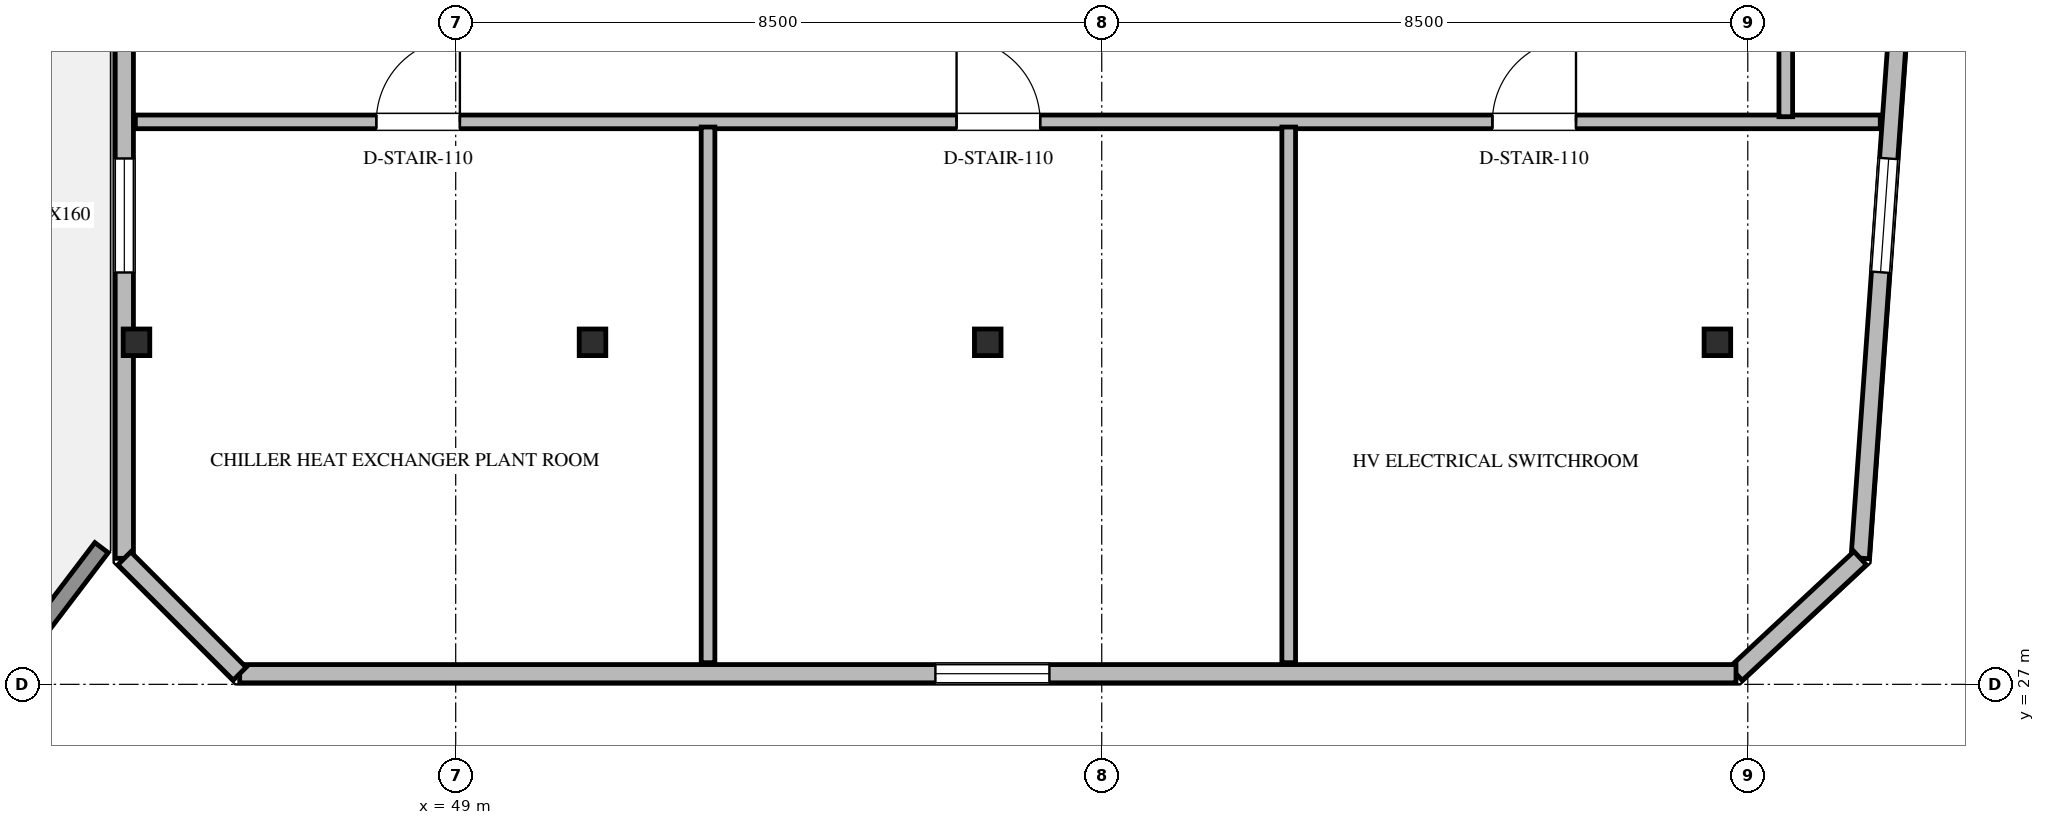
"""IFC4 building model, lengths in metres.
Left out: names, types, materials, properties, quantities, classifications, styles, units other than length and angle.
Written with IfcOpenShell. Run it as: python <this file> out.ifc"""

import sys

from ifc_helpers import new_model, si_unit, direction, frame, frame_2d, origin, origin_2d, place, context, subcontext, project, spatial, rectangle, hollow_rectangle, extrude, element, fill, save


model = new_model("IFC4")
c1 = context("Model", 3, precision=1e-05, world=origin(), true_north=direction((0.0, 1.0)))
c2 = subcontext(c1, "Body", "Model", "MODEL_VIEW")
j1 = project(units=[si_unit("LENGTHUNIT", "METRE"), si_unit("PLANEANGLEUNIT", "RADIAN")], contexts=[c1])
p1 = place(None, origin())
s1 = spatial("IfcSite", under=j1, at=p1, CompositionType="ELEMENT")
p2 = place(p1, origin())
s2 = spatial("IfcBuilding", under=s1, at=p2, CompositionType="ELEMENT")
p3 = place(p2, frame((0.0, 0.0, 315.6)))
s3 = spatial("IfcBuildingStorey", under=s2, at=p3, CompositionType="ELEMENT", Elevation=315.6)
for number, where, z_axis, x_axis in (
    (1, (56.0, 31.5, 0.0), (0.0, 0.0, 1.0), (1.0, 0.0, 0.0)),
    (2, (65.6, 31.5, 0.0), (0.0, 0.0, 1.0), (1.0, 0.0, 0.0)),
    (3, (50.8, 31.5, 0.0), (0.0, 0.0, 1.0), (1.0, 0.0, 0.0)),
    (4, (44.8, 31.5, 0.0), (0.0, 0.0, 1.0), (1.0, 0.0, 0.0)),
):
    element("IfcColumn", number, at=place(p3, frame(where, z_axis=z_axis, x_axis=x_axis)), inside=s3, PredefinedType="COLUMN", context=c2, shape_type="SweptSolid", body=[
        extrude(hollow_rectangle(XDim=0.35, YDim=0.35, WallThickness=0.016, at=origin_2d()), origin(), (0.0, 0.0, 1.0), 3.6),
    ])
p4 = place(p3, frame((44.34, 28.798, 0.0), z_axis=(0.0, 0.0, 1.0), x_axis=(-0.605088696204, -0.796158068304, 0.0)))
e5 = element("IfcWall", 5, at=p4, inside=s3, PredefinedType="PARAPET", context=c2, shape_type="SweptSolid", body=[
    extrude(rectangle(XDim=11.403, YDim=0.22, at=frame_2d((5.701, 0.0))), origin(), (0.0, 0.0, 1.0), 1.2),
])
p5 = place(p3, frame((44.64, 28.658, 0.0), z_axis=(0.0, 0.0, 1.0), x_axis=(0.0, 1.0, 0.0)))
e6 = element("IfcWall", 6, at=p5, inside=s3, PredefinedType="STANDARD", context=c2, shape_type="SweptSolid", body=[
    extrude(rectangle(XDim=9.142, YDim=0.24, at=frame_2d((4.571, 0.0))), origin(), (0.0, 0.0, 1.0), 2.709),
])
p6 = place(p5, frame((3.76, 0.0, 0.9)))
e7 = element("IfcOpeningElement", 7, at=p6, cuts=e6, PredefinedType="OPENING", context=c2, shape_type="SweptSolid", body=[
    extrude(rectangle(XDim=1.5, YDim=1.6, at=frame_2d((0.75, 0.8))), frame((0.0, 0.13, 0.0), z_axis=(0.0, -1.0, 0.0), x_axis=(1.0, 0.0, 0.0)), (0.0, 0.0, 1.0), 0.26),
])
p7 = place(p3, frame((68.131, 37.8, 0.0), z_axis=(0.0, 0.0, 1.0), x_axis=(-0.071250837206, -0.997458429308, 0.0)))
e8 = element("IfcWall", 8, at=p7, inside=s3, PredefinedType="STANDARD", context=c2, shape_type="SweptSolid", body=[
    extrude(rectangle(XDim=9.162, YDim=0.24, at=frame_2d((4.581, 0.0))), origin(), (0.0, 0.0, 1.0), 3.32),
])
p8 = place(p7, frame((3.892, 0.0, 0.9)))
e9 = element("IfcOpeningElement", 9, at=p8, cuts=e8, PredefinedType="OPENING", context=c2, shape_type="SweptSolid", body=[
    extrude(rectangle(XDim=1.5, YDim=1.6, at=frame_2d((0.75, 0.8))), frame((0.0, 0.13, 0.0), z_axis=(0.0, -1.0, 0.0), x_axis=(1.0, 0.0, 0.0)), (0.0, 0.0, 1.0), 0.26),
])
p9 = place(p3, frame((67.478, 28.661, 0.0), z_axis=(0.0, 0.0, 1.0), x_axis=(-0.731818720836, -0.681499346907, 0.0)))
e10 = element("IfcWall", 10, at=p9, inside=s3, PredefinedType="STANDARD", context=c2, shape_type="SweptSolid", body=[
    extrude(rectangle(XDim=2.232, YDim=0.24, at=frame_2d((1.116, 0.0))), origin(), (0.0, 0.0, 1.0), 3.32),
])
p10 = place(p3, frame((65.845, 27.14, 0.0), z_axis=(0.0, 0.0, 1.0), x_axis=(-1.0, 0.0, 0.0)))
e11 = element("IfcWall", 11, at=p10, inside=s3, PredefinedType="STANDARD", context=c2, shape_type="SweptSolid", body=[
    extrude(rectangle(XDim=19.687, YDim=0.24, at=frame_2d((9.844, 0.0))), origin(), (0.0, 0.0, 1.0), 3.32),
])
p11 = place(p10, frame((9.033, 0.0, 0.9)))
e12 = element("IfcOpeningElement", 12, at=p11, cuts=e11, PredefinedType="OPENING", context=c2, shape_type="SweptSolid", body=[
    extrude(rectangle(XDim=1.5, YDim=1.6, at=frame_2d((0.75, 0.8))), frame((0.0, 0.13, 0.0), z_axis=(0.0, -1.0, 0.0), x_axis=(1.0, 0.0, 0.0)), (0.0, 0.0, 1.0), 0.26),
])
p12 = place(p3, frame((46.158, 27.14, 0.0), z_axis=(0.0, 0.0, 1.0), x_axis=(-0.707106781187, 0.707106781187, 0.0)))
e13 = element("IfcWall", 13, at=p12, inside=s3, PredefinedType="STANDARD", context=c2, shape_type="SweptSolid", body=[
    extrude(rectangle(XDim=2.147, YDim=0.24, at=frame_2d((1.073, 0.0))), origin(), (0.0, 0.0, 1.0), 3.32),
])
p13 = place(p3, frame((44.785, 34.4, 0.0), z_axis=(0.0, 0.0, 1.0), x_axis=(1.0, 0.0, 0.0)))
e14 = element("IfcWall", 14, at=p13, inside=s3, PredefinedType="STANDARD", context=c2, shape_type="SweptSolid", body=[
    extrude(rectangle(XDim=22.958, YDim=0.18, at=frame_2d((11.479, 0.0))), origin(), (0.0, 0.0, 1.0), 2.709),
])
p14 = place(p13, frame((3.17, 0.0, 0.0)))
e15 = element("IfcOpeningElement", 15, at=p14, cuts=e14, PredefinedType="OPENING", context=c2, shape_type="SweptSolid", body=[
    extrude(rectangle(XDim=1.1, YDim=2.2, at=frame_2d((0.55, 1.1))), frame((0.0, 0.1, 0.0), z_axis=(0.0, -1.0, 0.0), x_axis=(1.0, 0.0, 0.0)), (0.0, 0.0, 1.0), 0.2),
])
p15 = place(p13, frame((10.805, 0.0, 0.0)))
e16 = element("IfcOpeningElement", 16, at=p15, cuts=e14, PredefinedType="OPENING", context=c2, shape_type="SweptSolid", body=[
    extrude(rectangle(XDim=1.1, YDim=2.2, at=frame_2d((0.55, 1.1))), frame((0.0, 0.1, 0.0), z_axis=(0.0, -1.0, 0.0), x_axis=(1.0, 0.0, 0.0)), (0.0, 0.0, 1.0), 0.2),
])
p16 = place(p13, frame((17.855, 0.0, 0.0)))
e17 = element("IfcOpeningElement", 17, at=p16, cuts=e14, PredefinedType="OPENING", context=c2, shape_type="SweptSolid", body=[
    extrude(rectangle(XDim=1.1, YDim=2.2, at=frame_2d((0.55, 1.1))), frame((0.0, 0.1, 0.0), z_axis=(0.0, -1.0, 0.0), x_axis=(1.0, 0.0, 0.0)), (0.0, 0.0, 1.0), 0.2),
])
p17 = place(p3, frame((66.5, 34.468, 0.0), z_axis=(0.0, 0.0, 1.0), x_axis=(0.0, 1.0, 0.0)))
e18 = element("IfcWall", 18, at=p17, inside=s3, PredefinedType="STANDARD", context=c2, shape_type="SweptSolid", body=[
    extrude(rectangle(XDim=3.582, YDim=0.18, at=frame_2d((1.791, 0.0))), origin(), (0.0, 0.0, 1.0), 2.709),
])
for number, where, z_axis, x_axis in (
    (19, (52.32, 27.285, 0.0), (0.0, 0.0, 1.0), (0.0, 1.0, 0.0)),
    (20, (59.96, 27.285, 0.0), (0.0, 0.0, 1.0), (0.0, 1.0, 0.0)),
):
    element("IfcWall", number, at=place(p3, frame(where, z_axis=z_axis, x_axis=x_axis)), inside=s3, PredefinedType="STANDARD", context=c2, shape_type="SweptSolid", body=[
        extrude(rectangle(XDim=7.047, YDim=0.18, at=frame_2d((3.523, 0.0))), origin(), (0.0, 0.0, 1.0), 2.709),
    ])
p18 = place(p6, origin())
e21 = element("IfcWindow", 21, at=p18, inside=s3, PartitioningType="SINGLE_PANEL", PredefinedType="WINDOW", context=c2, shape_type="SweptSolid", body=[
    extrude(rectangle(XDim=1.5, YDim=1.6, at=frame_2d((0.75, 0.8))), frame((0.0, 0.03, 0.0), z_axis=(0.0, -1.0, 0.0), x_axis=(1.0, 0.0, 0.0)), (0.0, 0.0, 1.0), 0.06),
])
fill(e7, e21)
p19 = place(p8, origin())
e22 = element("IfcWindow", 22, at=p19, inside=s3, PartitioningType="SINGLE_PANEL", PredefinedType="WINDOW", context=c2, shape_type="SweptSolid", body=[
    extrude(rectangle(XDim=1.5, YDim=1.6, at=frame_2d((0.75, 0.8))), frame((0.0, 0.03, 0.0), z_axis=(0.0, -1.0, 0.0), x_axis=(1.0, 0.0, 0.0)), (0.0, 0.0, 1.0), 0.06),
])
fill(e9, e22)
p20 = place(p11, origin())
e23 = element("IfcWindow", 23, at=p20, inside=s3, PartitioningType="SINGLE_PANEL", PredefinedType="WINDOW", context=c2, shape_type="SweptSolid", body=[
    extrude(rectangle(XDim=1.5, YDim=1.6, at=frame_2d((0.75, 0.8))), frame((0.0, 0.03, 0.0), z_axis=(0.0, -1.0, 0.0), x_axis=(1.0, 0.0, 0.0)), (0.0, 0.0, 1.0), 0.06),
])
fill(e12, e23)
p21 = place(p14, origin())
e24 = element("IfcDoor", 24, at=p21, inside=s3, OperationType="SINGLE_SWING_RIGHT", PredefinedType="DOOR", context=c2, shape_type="SweptSolid", body=[
    extrude(rectangle(XDim=1.1, YDim=2.2, at=frame_2d((0.55, 1.1))), frame((0.0, 0.025, 0.0), z_axis=(0.0, -1.0, 0.0), x_axis=(1.0, 0.0, 0.0)), (0.0, 0.0, 1.0), 0.05),
])
fill(e15, e24)
p22 = place(p15, origin())
e25 = element("IfcDoor", 25, at=p22, inside=s3, OperationType="SINGLE_SWING_LEFT", PredefinedType="DOOR", context=c2, shape_type="SweptSolid", body=[
    extrude(rectangle(XDim=1.1, YDim=2.2, at=frame_2d((0.55, 1.1))), frame((0.0, 0.025, 0.0), z_axis=(0.0, -1.0, 0.0), x_axis=(1.0, 0.0, 0.0)), (0.0, 0.0, 1.0), 0.05),
])
fill(e16, e25)
p23 = place(p16, origin())
e26 = element("IfcDoor", 26, at=p23, inside=s3, OperationType="SINGLE_SWING_RIGHT", PredefinedType="DOOR", context=c2, shape_type="SweptSolid", body=[
    extrude(rectangle(XDim=1.1, YDim=2.2, at=frame_2d((0.55, 1.1))), frame((0.0, 0.025, 0.0), z_axis=(0.0, -1.0, 0.0), x_axis=(1.0, 0.0, 0.0)), (0.0, 0.0, 1.0), 0.05),
])
fill(e17, e26)
save(model, sys.argv[1])
